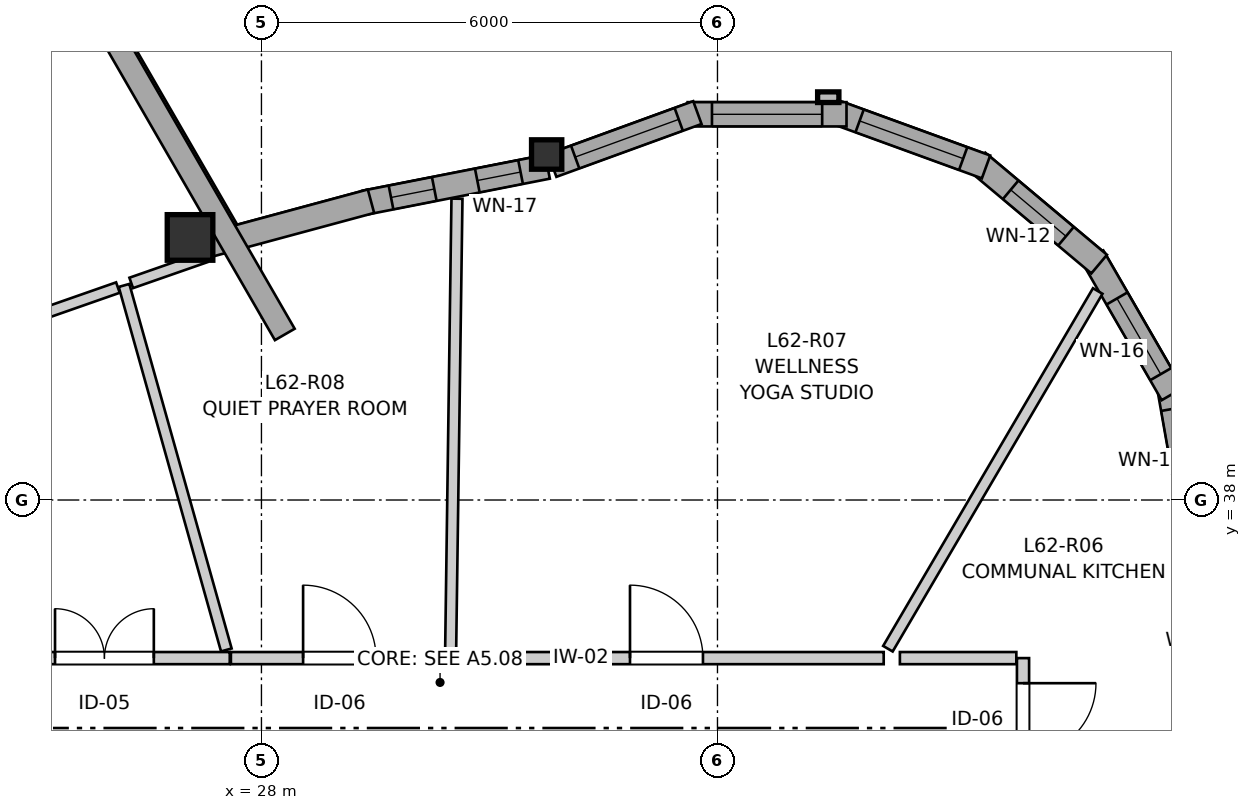
"""IFC4 building model, lengths in metres.
Left out: names, types, materials, properties, quantities, classifications, styles, units other than length and angle.
Written with IfcOpenShell. Run it as: python <this file> out.ifc"""

import sys

from ifc_helpers import new_model, si_unit, direction, frame, frame_2d, origin, origin_2d, place, context, subcontext, project, spatial, rectangle, i_section, extrude, source, transform, mapped, element, fill, save


model = new_model("IFC4")
c1 = context("Model", 3, precision=1e-05, world=origin(), true_north=direction((0.0, 1.0)))
c2 = subcontext(c1, "Body", "Model", "MODEL_VIEW")
j1 = project(units=[si_unit("LENGTHUNIT", "METRE"), si_unit("PLANEANGLEUNIT", "RADIAN")], contexts=[c1])
p1 = place(None, origin())
s1 = spatial("IfcSite", under=j1, at=p1, CompositionType="ELEMENT")
p2 = place(p1, origin())
s2 = spatial("IfcBuilding", under=s1, at=p2, CompositionType="ELEMENT")
p3 = place(p2, frame((0.0, 0.0, 208.4)))
s3 = spatial("IfcBuildingStorey", under=s2, at=p3, CompositionType="ELEMENT", Elevation=208.4)
m1 = source(origin(), c2, "Body", "SweptSolid", [
    extrude(i_section(OverallWidth=0.398, OverallDepth=0.387, WebThickness=0.019, FlangeThickness=0.03, FilletRadius=0.015, at=origin_2d()), origin(), (0.0, 0.0, 1.0), 2.935),
])
p4 = place(p3, frame((31.752, 42.545, 0.0), z_axis=(0.0, 0.0, 1.0), x_axis=(1.0, 0.0, 0.0)))
e1 = element("IfcColumn", 1, at=p4, inside=s3, PredefinedType="PILASTER", context=c2, shape_type="MappedRepresentation", body=[
    mapped(m1, transform((0.0, 0.0, 0.0), x_axis=(1.0, 0.0, 0.0), y_axis=(0.0, 1.0, 0.0), z_axis=(0.0, 0.0, 1.0), scale=1.0)),
])
m2 = source(origin(), c2, "Body", "SweptSolid", [
    extrude(rectangle(XDim=0.6, YDim=0.6, at=origin_2d()), origin(), (0.0, 0.0, 1.0), 2.935),
])
p5 = place(p3, frame((27.06, 41.454, 0.0), z_axis=(0.0, 0.0, 1.0), x_axis=(1.0, 0.0, 0.0)))
e2 = element("IfcColumn", 2, at=p5, inside=s3, PredefinedType="COLUMN", context=c2, shape_type="MappedRepresentation", body=[
    mapped(m2, transform((0.0, 0.0, 0.0), x_axis=(1.0, 0.0, 0.0), y_axis=(0.0, 1.0, 0.0), z_axis=(0.0, 0.0, 1.0), scale=1.0)),
])
p6 = place(p3, frame((40.279, 37.583, 0.0), z_axis=(0.0, 0.0, 1.0), x_axis=(-0.173671780312, 0.984803590937, 0.0)))
e3 = element("IfcWall", 3, at=p6, inside=s3, PredefinedType="SOLIDWALL", context=c2, shape_type="SweptSolid", body=[
    extrude(rectangle(XDim=1.962, YDim=0.32, at=frame_2d((0.981, 0.0))), origin(), (0.0, 0.0, 1.0), 2.555),
])
p7 = place(p6, frame((0.391, 0.0, 0.82)))
e4 = element("IfcOpeningElement", 4, at=p7, cuts=e3, PredefinedType="OPENING", context=c2, shape_type="SweptSolid", body=[
    extrude(rectangle(XDim=1.25, YDim=1.35, at=frame_2d((0.625, 0.675))), frame((0.0, 0.17, 0.0), z_axis=(0.0, -1.0, 0.0), x_axis=(1.0, 0.0, 0.0)), (0.0, 0.0, 1.0), 0.34),
])
p8 = place(p3, frame((39.983, 39.393, 0.0), z_axis=(0.0, 0.0, 1.0), x_axis=(-0.499995423472, 0.866028046028, 0.0)))
e5 = element("IfcWall", 5, at=p8, inside=s3, PredefinedType="SOLIDWALL", context=c2, shape_type="SweptSolid", body=[
    extrude(rectangle(XDim=2.09, YDim=0.32, at=frame_2d((1.045, 0.0))), origin(), (0.0, 0.0, 1.0), 2.555),
])
p9 = place(p8, frame((0.303, 0.0, 0.82)))
e6 = element("IfcOpeningElement", 6, at=p9, cuts=e5, PredefinedType="OPENING", context=c2, shape_type="SweptSolid", body=[
    extrude(rectangle(XDim=1.15, YDim=1.2, at=frame_2d((0.575, 0.6))), frame((0.0, 0.17, 0.0), z_axis=(0.0, -1.0, 0.0), x_axis=(1.0, 0.0, 0.0)), (0.0, 0.0, 1.0), 0.34),
])
p10 = place(p3, frame((39.022, 41.104, 0.0), z_axis=(0.0, 0.0, 1.0), x_axis=(-0.766072824549, 0.642753784499, 0.0)))
e7 = element("IfcWall", 7, at=p10, inside=s3, PredefinedType="SOLIDWALL", context=c2, shape_type="SweptSolid", body=[
    extrude(rectangle(XDim=2.091, YDim=0.32, at=frame_2d((1.045, 0.0))), origin(), (0.0, 0.0, 1.0), 2.555),
])
p11 = place(p10, frame((0.57, 0.0, 0.82)))
e8 = element("IfcOpeningElement", 8, at=p11, cuts=e7, PredefinedType="OPENING", context=c2, shape_type="SweptSolid", body=[
    extrude(rectangle(XDim=0.95, YDim=1.35, at=frame_2d((0.475, 0.675))), frame((0.0, 0.17, 0.0), z_axis=(0.0, -1.0, 0.0), x_axis=(1.0, 0.0, 0.0)), (0.0, 0.0, 1.0), 0.34),
])
p12 = place(p3, frame((37.533, 42.382, 0.0), z_axis=(0.0, 0.0, 1.0), x_axis=(-0.939697896412, 0.342005648315, 0.0)))
e9 = element("IfcWall", 9, at=p12, inside=s3, PredefinedType="SOLIDWALL", context=c2, shape_type="SweptSolid", body=[
    extrude(rectangle(XDim=2.09, YDim=0.32, at=frame_2d((1.045, 0.0))), origin(), (0.0, 0.0, 1.0), 2.555),
])
p13 = place(p12, frame((0.32, 0.0, 0.82)))
e10 = element("IfcOpeningElement", 10, at=p13, cuts=e9, PredefinedType="OPENING", context=c2, shape_type="SweptSolid", body=[
    extrude(rectangle(XDim=1.45, YDim=1.25, at=frame_2d((0.725, 0.625))), frame((0.0, 0.17, 0.0), z_axis=(0.0, -1.0, 0.0), x_axis=(1.0, 0.0, 0.0)), (0.0, 0.0, 1.0), 0.34),
])
p14 = place(p3, frame((35.698, 43.074, 0.0), z_axis=(0.0, 0.0, 1.0), x_axis=(-1.0, 0.0, 0.0)))
e11 = element("IfcWall", 11, at=p14, inside=s3, PredefinedType="SOLIDWALL", context=c2, shape_type="SweptSolid", body=[
    extrude(rectangle(XDim=2.09, YDim=0.32, at=frame_2d((1.045, 0.0))), origin(), (0.0, 0.0, 1.0), 2.555),
])
p15 = place(p14, frame((0.32, 0.0, 0.82)))
e12 = element("IfcOpeningElement", 12, at=p15, cuts=e11, PredefinedType="OPENING", context=c2, shape_type="SweptSolid", body=[
    extrude(rectangle(XDim=1.45, YDim=1.25, at=frame_2d((0.725, 0.625))), frame((0.0, 0.17, 0.0), z_axis=(0.0, -1.0, 0.0), x_axis=(1.0, 0.0, 0.0)), (0.0, 0.0, 1.0), 0.34),
])
p16 = place(p3, frame((33.736, 43.097, 0.0), z_axis=(0.0, 0.0, 1.0), x_axis=(-0.939691662178, -0.342022777067, 0.0)))
e13 = element("IfcWall", 13, at=p16, inside=s3, PredefinedType="SOLIDWALL", context=c2, shape_type="SweptSolid", body=[
    extrude(rectangle(XDim=2.032, YDim=0.32, at=frame_2d((1.016, 0.0))), origin(), (0.0, 0.0, 1.0), 2.555),
])
p17 = place(p16, frame((0.261, 0.0, 0.82)))
e14 = element("IfcOpeningElement", 14, at=p17, cuts=e13, PredefinedType="OPENING", context=c2, shape_type="SweptSolid", body=[
    extrude(rectangle(XDim=1.45, YDim=1.25, at=frame_2d((0.725, 0.625))), frame((0.0, 0.17, 0.0), z_axis=(0.0, -1.0, 0.0), x_axis=(1.0, 0.0, 0.0)), (0.0, 0.0, 1.0), 0.34),
])
p18 = place(p3, frame((31.764, 42.385, 0.0), z_axis=(0.0, 0.0, 1.0), x_axis=(-0.981229659911, -0.192842823335, 0.0)))
e15 = element("IfcWall", 15, at=p18, inside=s3, PredefinedType="SOLIDWALL", context=c2, shape_type="SweptSolid", body=[
    extrude(rectangle(XDim=2.454, YDim=0.32, at=frame_2d((1.227, 0.0))), origin(), (0.0, 0.0, 1.0), 2.555),
])
p19 = place(p18, frame((0.361, 0.0, 0.82)))
e16 = element("IfcOpeningElement", 16, at=p19, cuts=e15, PredefinedType="OPENING", context=c2, shape_type="SweptSolid", body=[
    extrude(rectangle(XDim=0.58, YDim=1.35, at=frame_2d((0.29, 0.675))), frame((0.0, 0.17, 0.0), z_axis=(0.0, -1.0, 0.0), x_axis=(1.0, 0.0, 0.0)), (0.0, 0.0, 1.0), 0.34),
])
p20 = place(p18, frame((1.518, 0.0, 0.82)))
e17 = element("IfcOpeningElement", 17, at=p20, cuts=e15, PredefinedType="OPENING", context=c2, shape_type="SweptSolid", body=[
    extrude(rectangle(XDim=0.58, YDim=1.35, at=frame_2d((0.29, 0.675))), frame((0.0, 0.17, 0.0), z_axis=(0.0, -1.0, 0.0), x_axis=(1.0, 0.0, 0.0)), (0.0, 0.0, 1.0), 0.34),
])
p21 = place(p3, frame((29.441, 41.931, 0.0), z_axis=(0.0, 0.0, 1.0), x_axis=(-0.965448832587, -0.260592693023, 0.0)))
e18 = element("IfcWall", 18, at=p21, inside=s3, PredefinedType="SOLIDWALL", context=c2, shape_type="SweptSolid", body=[
    extrude(rectangle(XDim=2.333, YDim=0.32, at=frame_2d((1.167, 0.0))), origin(), (0.0, 0.0, 1.0), 2.555),
])
p22 = place(p3, frame((28.307, 40.178, 0.0), z_axis=(0.0, 0.0, 1.0), x_axis=(-0.500003467681, 0.866023401709, 0.0)))
e19 = element("IfcWall", 19, at=p22, inside=s3, PredefinedType="SOLIDWALL", context=c2, shape_type="SweptSolid", body=[
    extrude(rectangle(XDim=19.929, YDim=0.3, at=frame_2d((9.964, 0.0))), origin(), (0.0, 0.0, 1.0), 2.115),
])
p23 = place(p3, frame((30.474, 35.92, 0.0), z_axis=(0.0, 0.0, 1.0), x_axis=(1.0, 0.0, 0.0)))
e20 = element("IfcWall", 20, at=p23, inside=s3, PredefinedType="PARTITIONING", context=c2, shape_type="SweptSolid", body=[
    extrude(rectangle(XDim=5.713, YDim=0.16, at=frame_2d((2.856, 0.0))), origin(), (0.0, 0.0, 1.0), 2.935),
])
p24 = place(p23, frame((2.375, 0.0, 0.0)))
e21 = element("IfcOpeningElement", 21, at=p24, cuts=e20, PredefinedType="OPENING", context=c2, shape_type="SweptSolid", body=[
    extrude(rectangle(XDim=0.96, YDim=2.1, at=frame_2d((0.48, 1.05))), frame((0.0, 0.09, 0.0), z_axis=(0.0, -1.0, 0.0), x_axis=(1.0, 0.0, 0.0)), (0.0, 0.0, 1.0), 0.18),
])
p25 = place(p3, frame((24.3, 35.92, 0.0), z_axis=(0.0, 0.0, 1.0), x_axis=(1.0, 0.0, 0.0)))
e22 = element("IfcWall", 22, at=p25, inside=s3, PredefinedType="PARTITIONING", context=c2, shape_type="SweptSolid", body=[
    extrude(rectangle(XDim=3.283, YDim=0.16, at=frame_2d((1.642, 0.0))), origin(), (0.0, 0.0, 1.0), 2.935),
])
p26 = place(p25, frame((0.984, 0.0, 0.0)))
e23 = element("IfcOpeningElement", 23, at=p26, cuts=e22, PredefinedType="OPENING", context=c2, shape_type="SweptSolid", body=[
    extrude(rectangle(XDim=1.3, YDim=2.1, at=frame_2d((0.65, 1.05))), frame((0.0, 0.09, 0.0), z_axis=(0.0, -1.0, 0.0), x_axis=(1.0, 0.0, 0.0)), (0.0, 0.0, 1.0), 0.18),
])
p27 = place(p3, frame((27.598, 35.92, 0.0), z_axis=(0.0, 0.0, 1.0), x_axis=(1.0, 0.0, 0.0)))
e24 = element("IfcWall", 24, at=p27, inside=s3, PredefinedType="PARTITIONING", context=c2, shape_type="SweptSolid", body=[
    extrude(rectangle(XDim=2.861, YDim=0.16, at=frame_2d((1.431, 0.0))), origin(), (0.0, 0.0, 1.0), 2.935),
])
p28 = place(p27, frame((0.95, 0.0, 0.0)))
e25 = element("IfcOpeningElement", 25, at=p28, cuts=e24, PredefinedType="OPENING", context=c2, shape_type="SweptSolid", body=[
    extrude(rectangle(XDim=0.96, YDim=2.1, at=frame_2d((0.48, 1.05))), frame((0.0, 0.09, 0.0), z_axis=(0.0, -1.0, 0.0), x_axis=(1.0, 0.0, 0.0)), (0.0, 0.0, 1.0), 0.18),
])
p29 = place(p3, frame((38.02, 35.92, 0.0), z_axis=(0.0, 0.0, 1.0), x_axis=(0.0, -1.0, 0.0)))
e26 = element("IfcWall", 26, at=p29, inside=s3, PredefinedType="PARTITIONING", context=c2, shape_type="SweptSolid", body=[
    extrude(rectangle(XDim=1.62, YDim=0.16, at=frame_2d((0.81, 0.0))), origin(), (0.0, 0.0, 1.0), 2.603),
])
p30 = place(p29, frame((0.33, 0.0, 0.0)))
e27 = element("IfcOpeningElement", 27, at=p30, cuts=e26, PredefinedType="OPENING", context=c2, shape_type="SweptSolid", body=[
    extrude(rectangle(XDim=0.96, YDim=2.1, at=frame_2d((0.48, 1.05))), frame((0.0, 0.09, 0.0), z_axis=(0.0, -1.0, 0.0), x_axis=(1.0, 0.0, 0.0)), (0.0, 0.0, 1.0), 0.18),
])
p31 = place(p3, frame((30.489, 36.009, 0.0), z_axis=(0.0, 0.0, 1.0), x_axis=(0.013978627514, 0.999902294213, 0.0)))
e28 = element("IfcWall", 28, at=p31, inside=s3, PredefinedType="PARTITIONING", context=c2, shape_type="SweptSolid", body=[
    extrude(rectangle(XDim=5.956, YDim=0.145, at=frame_2d((2.978, 0.0))), origin(), (0.0, 0.0, 1.0), 2.935),
])
p32 = place(p3, frame((36.242, 36.044, 0.0), z_axis=(0.0, 0.0, 1.0), x_axis=(0.50599508157, 0.862536362959, 0.0)))
e29 = element("IfcWall", 29, at=p32, inside=s3, PredefinedType="PARTITIONING", context=c2, shape_type="SweptSolid", body=[
    extrude(rectangle(XDim=5.456, YDim=0.145, at=frame_2d((2.728, 0.0))), origin(), (0.0, 0.0, 1.0), 2.935),
])
p33 = place(p3, frame((26.192, 40.823, 0.0), z_axis=(0.0, 0.0, 1.0), x_axis=(0.270218926069, -0.962798905273, 0.0)))
e30 = element("IfcWall", 30, at=p33, inside=s3, PredefinedType="PARTITIONING", context=c2, shape_type="SweptSolid", body=[
    extrude(rectangle(XDim=4.981, YDim=0.145, at=frame_2d((2.49, 0.0))), origin(), (0.0, 0.0, 1.0), 2.935),
])
p34 = place(p3, frame((38.154, 32.845, 0.0), z_axis=(0.0, 0.0, 1.0), x_axis=(0.751793032372, 0.659399148071, 0.0)))
e31 = element("IfcWall", 31, at=p34, inside=s3, PredefinedType="PARTITIONING", context=c2, shape_type="SweptSolid", body=[
    extrude(rectangle(XDim=3.631, YDim=0.145, at=frame_2d((1.815, 0.0))), origin(), (0.0, 0.0, 1.0), 2.935),
])
p35 = place(p3, frame((36.4, 35.92, 0.0), z_axis=(0.0, 0.0, 1.0), x_axis=(1.0, 0.0, 0.0)))
e32 = element("IfcWall", 32, at=p35, inside=s3, PredefinedType="PARTITIONING", context=c2, shape_type="SweptSolid", body=[
    extrude(rectangle(XDim=1.532, YDim=0.16, at=frame_2d((0.766, 0.0))), origin(), (0.0, 0.0, 1.0), 2.935),
])
p36 = place(p3, frame((24.973, 40.397, 0.0), z_axis=(0.0, 0.0, 1.0), x_axis=(0.943987684609, 0.329980683232, 0.0)))
e33 = element("IfcWall", 33, at=p36, inside=s3, PredefinedType="PARTITIONING", context=c2, shape_type="SweptSolid", body=[
    extrude(rectangle(XDim=1.206, YDim=0.145, at=frame_2d((0.603, 0.0))), origin(), (0.0, 0.0, 1.0), 2.543),
])
p37 = place(p3, frame((26.287, 40.856, 0.0), z_axis=(0.0, 0.0, 1.0), x_axis=(0.944089421658, 0.329689496214, 0.0)))
e34 = element("IfcWall", 34, at=p37, inside=s3, PredefinedType="PARTITIONING", context=c2, shape_type="SweptSolid", body=[
    extrude(rectangle(XDim=1.037, YDim=0.145, at=frame_2d((0.518, 0.0))), origin(), (0.0, 0.0, 1.0), 2.543),
])
m3 = source(origin(), c2, "Body", "SweptSolid", [
    extrude(rectangle(XDim=1.25, YDim=1.35, at=frame_2d((0.625, 0.675))), frame((0.0, 0.03, 0.0), z_axis=(0.0, -1.0, 0.0), x_axis=(1.0, 0.0, 0.0)), (0.0, 0.0, 1.0), 0.06),
])
p38 = place(p7, origin())
e35 = element("IfcWindow", 35, at=p38, inside=s3, PartitioningType="SINGLE_PANEL", PredefinedType="WINDOW", context=c2, shape_type="MappedRepresentation", body=[
    mapped(m3, transform((0.0, 0.0, 0.0), x_axis=(1.0, 0.0, 0.0), y_axis=(0.0, 1.0, 0.0), z_axis=(0.0, 0.0, 1.0), scale=1.0)),
])
fill(e4, e35)
m4 = source(origin(), c2, "Body", "SweptSolid", [
    extrude(rectangle(XDim=1.15, YDim=1.2, at=frame_2d((0.575, 0.6))), frame((0.0, 0.03, 0.0), z_axis=(0.0, -1.0, 0.0), x_axis=(1.0, 0.0, 0.0)), (0.0, 0.0, 1.0), 0.06),
])
p39 = place(p9, origin())
e36 = element("IfcWindow", 36, at=p39, inside=s3, PartitioningType="SINGLE_PANEL", PredefinedType="WINDOW", context=c2, shape_type="MappedRepresentation", body=[
    mapped(m4, transform((0.0, 0.0, 0.0), x_axis=(1.0, 0.0, 0.0), y_axis=(0.0, 1.0, 0.0), z_axis=(0.0, 0.0, 1.0), scale=1.0)),
])
fill(e6, e36)
m5 = source(origin(), c2, "Body", "SweptSolid", [
    extrude(rectangle(XDim=0.95, YDim=1.35, at=frame_2d((0.475, 0.675))), frame((0.0, 0.03, 0.0), z_axis=(0.0, -1.0, 0.0), x_axis=(1.0, 0.0, 0.0)), (0.0, 0.0, 1.0), 0.06),
])
p40 = place(p11, origin())
e37 = element("IfcWindow", 37, at=p40, inside=s3, PartitioningType="SINGLE_PANEL", PredefinedType="WINDOW", context=c2, shape_type="MappedRepresentation", body=[
    mapped(m5, transform((0.0, 0.0, 0.0), x_axis=(1.0, 0.0, 0.0), y_axis=(0.0, 1.0, 0.0), z_axis=(0.0, 0.0, 1.0), scale=1.0)),
])
fill(e8, e37)
m6 = source(origin(), c2, "Body", "SweptSolid", [
    extrude(rectangle(XDim=1.45, YDim=1.25, at=frame_2d((0.725, 0.625))), frame((0.0, 0.03, 0.0), z_axis=(0.0, -1.0, 0.0), x_axis=(1.0, 0.0, 0.0)), (0.0, 0.0, 1.0), 0.06),
])
p41 = place(p13, origin())
e38 = element("IfcWindow", 38, at=p41, inside=s3, PartitioningType="SINGLE_PANEL", PredefinedType="WINDOW", context=c2, shape_type="MappedRepresentation", body=[
    mapped(m6, transform((0.0, 0.0, 0.0), x_axis=(1.0, 0.0, 0.0), y_axis=(0.0, 1.0, 0.0), z_axis=(0.0, 0.0, 1.0), scale=1.0)),
])
fill(e10, e38)
p42 = place(p15, origin())
e39 = element("IfcWindow", 39, at=p42, inside=s3, PartitioningType="SINGLE_PANEL", PredefinedType="WINDOW", context=c2, shape_type="MappedRepresentation", body=[
    mapped(m6, transform((0.0, 0.0, 0.0), x_axis=(1.0, 0.0, 0.0), y_axis=(0.0, 1.0, 0.0), z_axis=(0.0, 0.0, 1.0), scale=1.0)),
])
fill(e12, e39)
p43 = place(p17, origin())
e40 = element("IfcWindow", 40, at=p43, inside=s3, PartitioningType="SINGLE_PANEL", PredefinedType="WINDOW", context=c2, shape_type="MappedRepresentation", body=[
    mapped(m6, transform((0.0, 0.0, 0.0), x_axis=(1.0, 0.0, 0.0), y_axis=(0.0, 1.0, 0.0), z_axis=(0.0, 0.0, 1.0), scale=1.0)),
])
fill(e14, e40)
m7 = source(origin(), c2, "Body", "SweptSolid", [
    extrude(rectangle(XDim=0.58, YDim=1.35, at=frame_2d((0.29, 0.675))), frame((0.0, 0.03, 0.0), z_axis=(0.0, -1.0, 0.0), x_axis=(1.0, 0.0, 0.0)), (0.0, 0.0, 1.0), 0.06),
])
p44 = place(p19, origin())
e41 = element("IfcWindow", 41, at=p44, inside=s3, PartitioningType="SINGLE_PANEL", PredefinedType="WINDOW", context=c2, shape_type="MappedRepresentation", body=[
    mapped(m7, transform((0.0, 0.0, 0.0), x_axis=(1.0, 0.0, 0.0), y_axis=(0.0, 1.0, 0.0), z_axis=(0.0, 0.0, 1.0), scale=1.0)),
])
fill(e16, e41)
p45 = place(p20, origin())
e42 = element("IfcWindow", 42, at=p45, inside=s3, PartitioningType="SINGLE_PANEL", PredefinedType="WINDOW", context=c2, shape_type="MappedRepresentation", body=[
    mapped(m7, transform((0.0, 0.0, 0.0), x_axis=(1.0, 0.0, 0.0), y_axis=(0.0, 1.0, 0.0), z_axis=(0.0, 0.0, 1.0), scale=1.0)),
])
fill(e17, e42)
m8 = source(origin(), c2, "Body", "SweptSolid", [
    extrude(rectangle(XDim=0.96, YDim=2.1, at=frame_2d((0.48, 1.05))), frame((0.0, 0.025, 0.0), z_axis=(0.0, -1.0, 0.0), x_axis=(1.0, 0.0, 0.0)), (0.0, 0.0, 1.0), 0.05),
])
p46 = place(p24, origin())
e43 = element("IfcDoor", 43, at=p46, inside=s3, OperationType="SINGLE_SWING_LEFT", PredefinedType="DOOR", context=c2, shape_type="MappedRepresentation", body=[
    mapped(m8, transform((0.0, 0.0, 0.0), x_axis=(1.0, 0.0, 0.0), y_axis=(0.0, 1.0, 0.0), z_axis=(0.0, 0.0, 1.0), scale=1.0)),
])
fill(e21, e43)
m9 = source(origin(), c2, "Body", "SweptSolid", [
    extrude(rectangle(XDim=1.3, YDim=2.1, at=frame_2d((0.65, 1.05))), frame((0.0, 0.025, 0.0), z_axis=(0.0, -1.0, 0.0), x_axis=(1.0, 0.0, 0.0)), (0.0, 0.0, 1.0), 0.05),
])
p47 = place(p26, origin())
e44 = element("IfcDoor", 44, at=p47, inside=s3, OperationType="DOUBLE_DOOR_SINGLE_SWING", PredefinedType="DOOR", context=c2, shape_type="MappedRepresentation", body=[
    mapped(m9, transform((0.0, 0.0, 0.0), x_axis=(1.0, 0.0, 0.0), y_axis=(0.0, 1.0, 0.0), z_axis=(0.0, 0.0, 1.0), scale=1.0)),
])
fill(e23, e44)
p48 = place(p28, origin())
e45 = element("IfcDoor", 45, at=p48, inside=s3, OperationType="SINGLE_SWING_LEFT", PredefinedType="DOOR", context=c2, shape_type="MappedRepresentation", body=[
    mapped(m8, transform((0.0, 0.0, 0.0), x_axis=(1.0, 0.0, 0.0), y_axis=(0.0, 1.0, 0.0), z_axis=(0.0, 0.0, 1.0), scale=1.0)),
])
fill(e25, e45)
p49 = place(p30, origin())
e46 = element("IfcDoor", 46, at=p49, inside=s3, OperationType="SINGLE_SWING_LEFT", PredefinedType="DOOR", context=c2, shape_type="MappedRepresentation", body=[
    mapped(m8, transform((0.0, 0.0, 0.0), x_axis=(1.0, 0.0, 0.0), y_axis=(0.0, 1.0, 0.0), z_axis=(0.0, 0.0, 1.0), scale=1.0)),
])
fill(e27, e46)
save(model, sys.argv[1])
